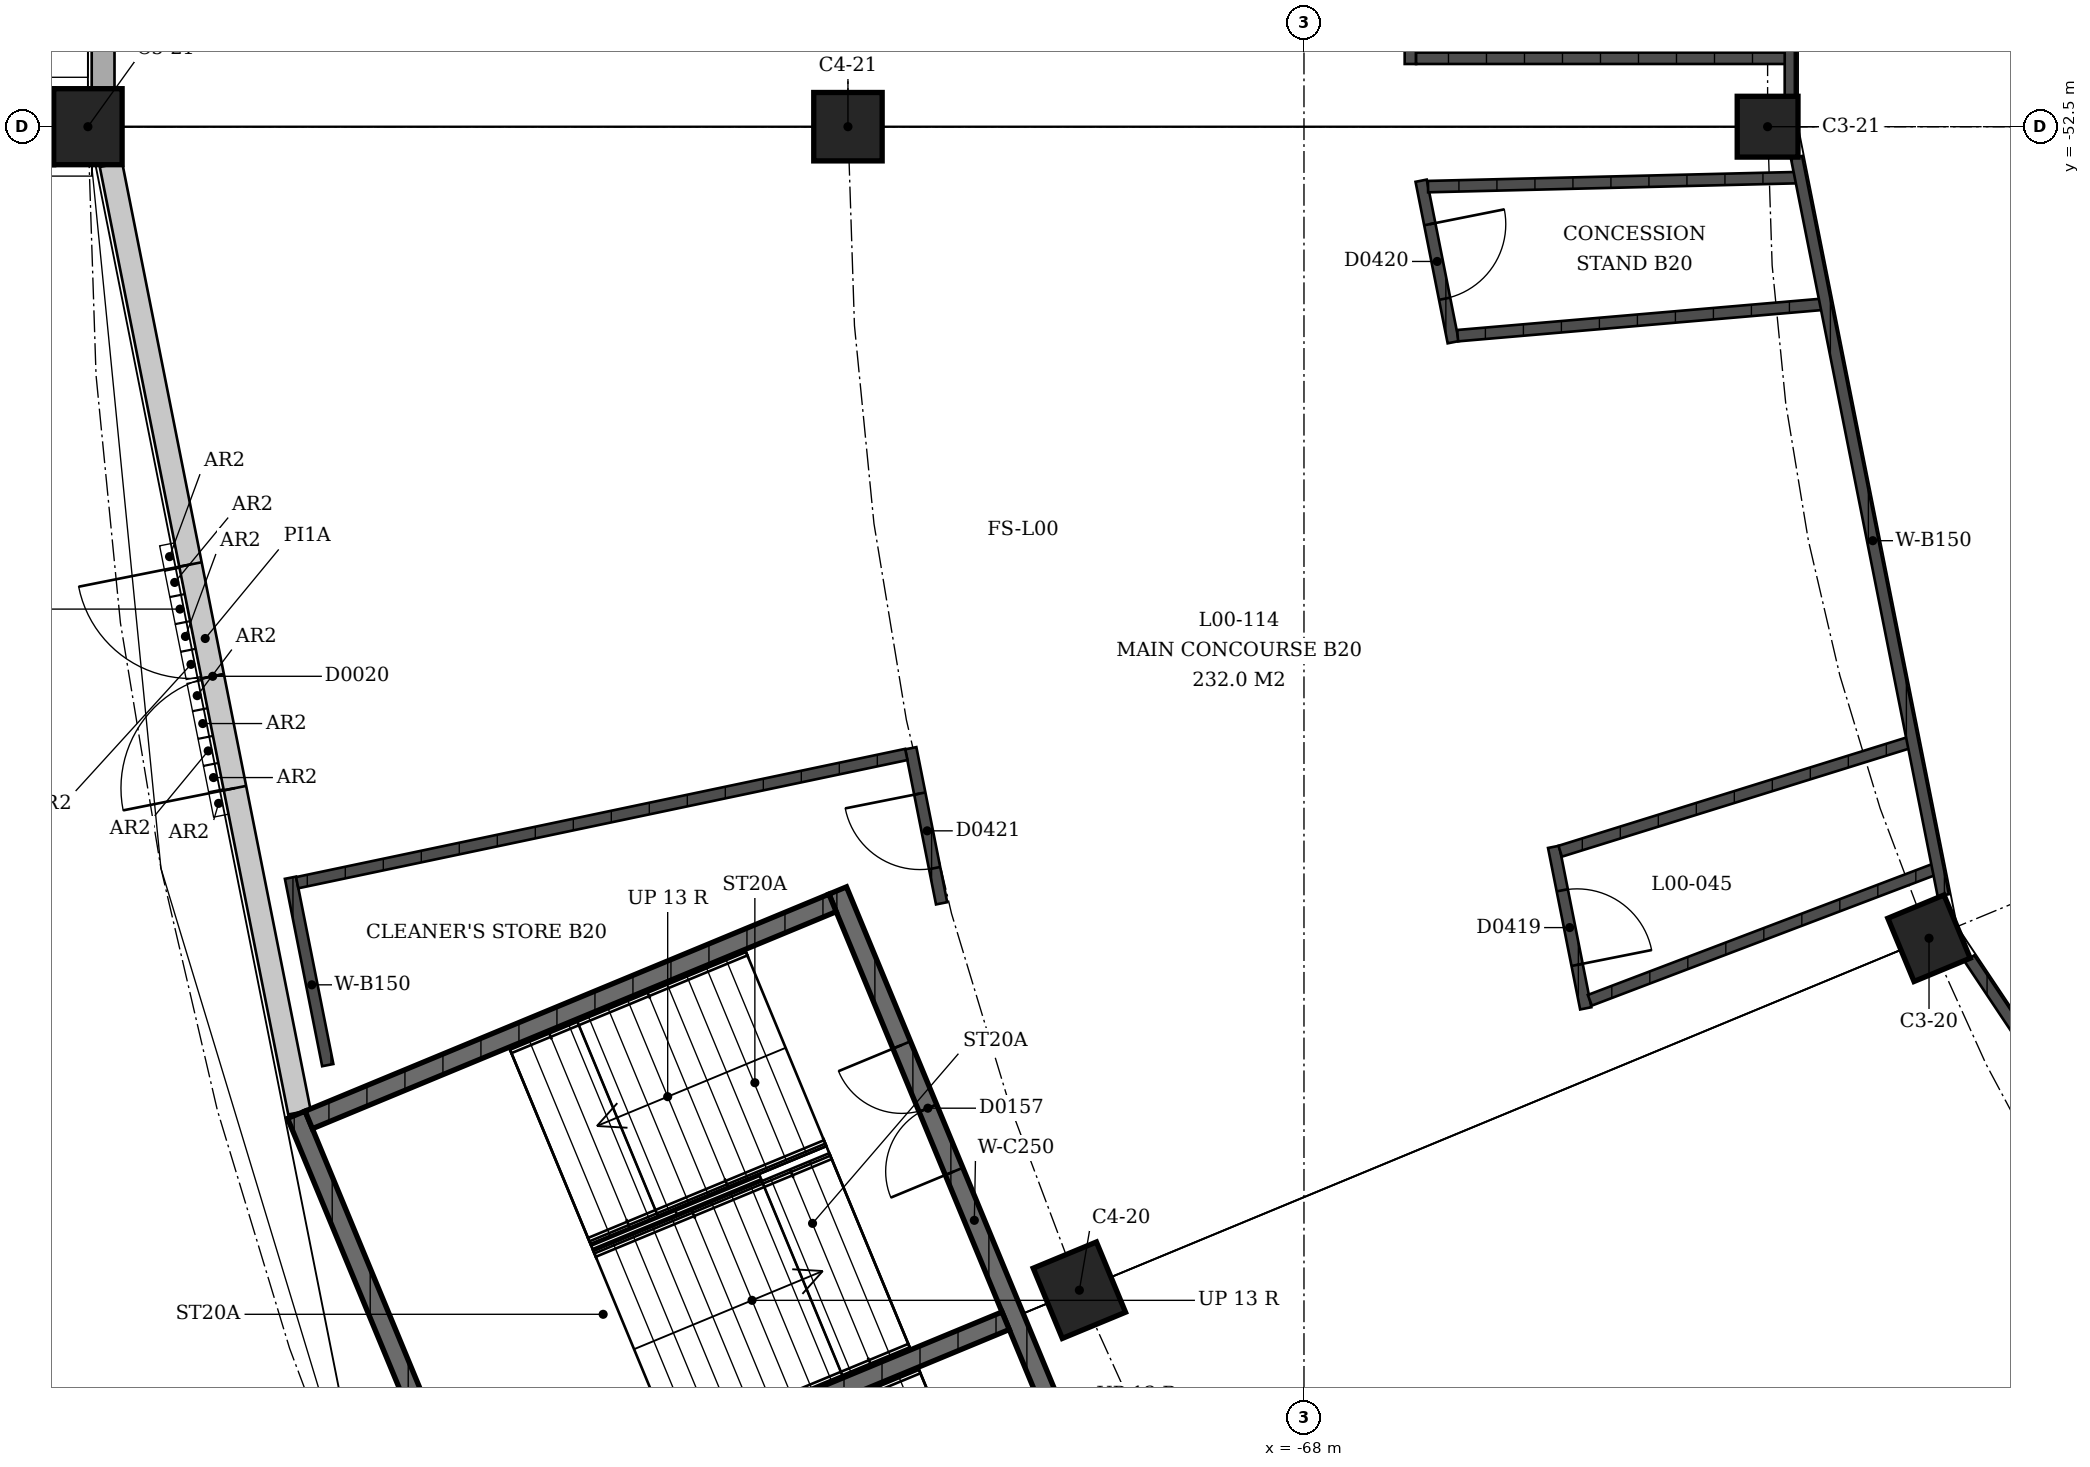
"""IFC4 building model, lengths in metres.
Left out: names, types, materials, properties, quantities, classifications, styles, units other than length and angle.
Written with IfcOpenShell. Run it as: python <this file> out.ifc"""

import sys

from ifc_helpers import new_model, si_unit, direction, frame, frame_2d, origin, origin_2d, place, context, subcontext, project, spatial, rectangle, extrude, element, fill, save


model = new_model("IFC4")
c1 = context("Model", 3, precision=1e-05, world=origin(), true_north=direction((0.0, 1.0)))
c2 = subcontext(c1, "Body", "Model", "MODEL_VIEW")
j1 = project(units=[si_unit("LENGTHUNIT", "METRE"), si_unit("PLANEANGLEUNIT", "RADIAN")], contexts=[c1])
p1 = place(None, origin())
s1 = spatial("IfcSite", under=j1, at=p1, CompositionType="ELEMENT")
p2 = place(p1, origin())
s2 = spatial("IfcBuilding", under=s1, at=p2, CompositionType="ELEMENT")
p3 = place(p2, origin())
s3 = spatial("IfcBuildingStorey", under=s2, at=p3, CompositionType="ELEMENT", Elevation=0.0)
p4 = place(p3, frame((-59.776, -63.177, 0.0), z_axis=(0.0, 0.0, 1.0), x_axis=(0.382683432365, -0.923879532511, 0.0)))
e1 = element("IfcColumn", 1, at=p4, inside=s3, PredefinedType="COLUMN", context=c2, shape_type="SweptSolid", body=[
    extrude(rectangle(XDim=0.9, YDim=0.8, at=origin_2d()), origin(), (0.0, 0.0, 1.0), 4.5),
])
p5 = place(p3, frame((-70.955, -67.807, 0.0), z_axis=(0.0, 0.0, 1.0), x_axis=(0.382683432365, -0.923879532511, 0.0)))
e2 = element("IfcColumn", 2, at=p5, inside=s3, PredefinedType="COLUMN", context=c2, shape_type="SweptSolid", body=[
    extrude(rectangle(XDim=1.0, YDim=0.9, at=origin_2d()), origin(), (0.0, 0.0, 1.0), 4.5),
])
p6 = place(p3, frame((-61.9, -52.5, 0.0), z_axis=(0.0, 0.0, 1.0), x_axis=(0.0, -1.0, 0.0)))
e3 = element("IfcColumn", 3, at=p6, inside=s3, PredefinedType="COLUMN", context=c2, shape_type="SweptSolid", body=[
    extrude(rectangle(XDim=0.8, YDim=0.8, at=origin_2d()), origin(), (0.0, 0.0, 1.0), 4.5),
])
p7 = place(p3, frame((-74.0, -52.5, 0.0), z_axis=(0.0, 0.0, 1.0), x_axis=(0.0, -1.0, 0.0)))
e4 = element("IfcColumn", 4, at=p7, inside=s3, PredefinedType="COLUMN", context=c2, shape_type="SweptSolid", body=[
    extrude(rectangle(XDim=0.9, YDim=0.9, at=origin_2d()), origin(), (0.0, 0.0, 1.0), 4.5),
])
p8 = place(p3, frame((-84.0, -52.5, 0.0), z_axis=(0.0, 0.0, 1.0), x_axis=(0.0, -1.0, 0.0)))
e5 = element("IfcColumn", 5, at=p8, inside=s3, PredefinedType="COLUMN", context=c2, shape_type="SweptSolid", body=[
    extrude(rectangle(XDim=1.0, YDim=0.9, at=origin_2d()), origin(), (0.0, 0.0, 1.0), 4.5),
])
p9 = place(p3, frame((-81.217, -65.467, 0.0), z_axis=(0.0, 0.0, 1.0), x_axis=(-0.195085497421, 0.980786240062, 0.0)))
e6 = element("IfcWall", 6, at=p9, inside=s3, PredefinedType="SOLIDWALL", context=c2, shape_type="SweptSolid", body=[
    extrude(rectangle(XDim=12.711, YDim=0.3, at=frame_2d((6.355, 0.0))), origin(), (0.0, 0.0, 1.0), 2.79),
])
p10 = place(p9, frame((4.349, 0.0, 0.0)))
e7 = element("IfcOpeningElement", 7, at=p10, cuts=e6, PredefinedType="OPENING", context=c2, shape_type="SweptSolid", body=[
    extrude(rectangle(XDim=3.0, YDim=2.4, at=frame_2d((1.5, 1.2))), frame((0.0, 0.16, 0.0), z_axis=(0.0, -1.0, 0.0), x_axis=(1.0, 0.0, 0.0)), (0.0, 0.0, 1.0), 0.32),
])
p11 = place(p3, frame((-83.8, -52.0, 0.0), z_axis=(0.0, 0.0, 1.0), x_axis=(0.0, 1.0, 0.0)))
e8 = element("IfcWall", 8, at=p11, inside=s3, PredefinedType="SOLIDWALL", context=c2, shape_type="SweptSolid", body=[
    extrude(rectangle(XDim=13.9, YDim=0.3, at=frame_2d((6.95, 0.0))), origin(), (0.0, 0.0, 1.0), 3.09),
])
p12 = place(p11, frame((2.062, 0.0, 0.0)))
e9 = element("IfcOpeningElement", 9, at=p12, cuts=e8, PredefinedType="OPENING", context=c2, shape_type="SweptSolid", body=[
    extrude(rectangle(XDim=4.8, YDim=2.4, at=frame_2d((2.4, 1.2))), frame((0.0, 0.16, 0.0), z_axis=(0.0, -1.0, 0.0), x_axis=(1.0, 0.0, 0.0)), (0.0, 0.0, 1.0), 0.32),
])
p13 = place(p3, frame((-74.135, -62.549, 0.0), z_axis=(0.0, 0.0, 1.0), x_axis=(0.382688386133, -0.923877480578, 0.0)))
e10 = element("IfcWall", 10, at=p13, inside=s3, PredefinedType="SHEAR", context=c2, shape_type="SweptSolid", body=[
    extrude(rectangle(XDim=12.15, YDim=0.25, at=frame_2d((6.075, 0.0))), origin(), (0.0, 0.0, 1.0), 4.09),
])
p14 = place(p13, frame((2.2, 0.0, 0.0)))
e11 = element("IfcOpeningElement", 11, at=p14, cuts=e10, PredefinedType="OPENING", context=c2, shape_type="SweptSolid", body=[
    extrude(rectangle(XDim=1.8, YDim=2.1, at=frame_2d((0.9, 1.05))), frame((0.0, 0.125, 0.0), z_axis=(0.0, -1.0, 0.0), x_axis=(1.0, 0.0, 0.0)), (0.0, 0.0, 1.0), 0.25),
])
p15 = place(p13, frame((8.15, 0.0, 0.0)))
e12 = element("IfcOpeningElement", 12, at=p15, cuts=e10, PredefinedType="OPENING", context=c2, shape_type="SweptSolid", body=[
    extrude(rectangle(XDim=1.8, YDim=2.1, at=frame_2d((0.9, 1.05))), frame((0.0, 0.125, 0.0), z_axis=(0.0, -1.0, 0.0), x_axis=(1.0, 0.0, 0.0)), (0.0, 0.0, 1.0), 0.25),
])
p16 = place(p3, frame((-81.258, -65.499, 0.0), z_axis=(0.0, 0.0, 1.0), x_axis=(0.382671234792, -0.923884584817, 0.0)))
e13 = element("IfcWall", 13, at=p16, inside=s3, PredefinedType="SHEAR", context=c2, shape_type="SweptSolid", body=[
    extrude(rectangle(XDim=12.15, YDim=0.25, at=frame_2d((6.075, 0.0))), origin(), (0.0, 0.0, 1.0), 4.09),
])
p17 = place(p3, frame((-74.202, -62.712, 0.0), z_axis=(0.0, 0.0, 1.0), x_axis=(-0.923887204407, -0.382664910245, 0.0)))
e14 = element("IfcWall", 14, at=p17, inside=s3, PredefinedType="SHEAR", context=c2, shape_type="SweptSolid", body=[
    extrude(rectangle(XDim=7.46, YDim=0.25, at=frame_2d((3.73, 0.0))), origin(), (0.0, 0.0, 1.0), 4.09),
])
p18 = place(p3, frame((-71.925, -68.209, 0.0), z_axis=(0.0, 0.0, 1.0), x_axis=(-0.923882412044, -0.382676480483, 0.0)))
e15 = element("IfcWall", 15, at=p18, inside=s3, PredefinedType="SHEAR", context=c2, shape_type="SweptSolid", body=[
    extrude(rectangle(XDim=7.46, YDim=0.25, at=frame_2d((3.73, 0.0))), origin(), (0.0, 0.0, 1.0), 4.09),
])
p19 = place(p3, frame((-64.293, -64.099, 0.0), z_axis=(0.0, 0.0, 1.0), x_axis=(-0.195075759432, 0.980788176969, 0.0)))
e16 = element("IfcWall", 16, at=p19, inside=s3, PredefinedType="SOLIDWALL", context=c2, shape_type="SweptSolid", body=[
    extrude(rectangle(XDim=2.166, YDim=0.15, at=frame_2d((1.083, 0.0))), origin(), (0.0, 0.0, 1.0), 3.0),
])
p20 = place(p19, frame((0.583, 0.0, 0.0)))
e17 = element("IfcOpeningElement", 17, at=p20, cuts=e16, PredefinedType="OPENING", context=c2, shape_type="SweptSolid", body=[
    extrude(rectangle(XDim=1.0, YDim=2.1, at=frame_2d((0.5, 1.05))), frame((0.0, 0.075, 0.0), z_axis=(0.0, -1.0, 0.0), x_axis=(1.0, 0.0, 0.0)), (0.0, 0.0, 1.0), 0.15),
])
p21 = place(p3, frame((-59.66, -62.253, 0.0), z_axis=(0.0, 0.0, 1.0), x_axis=(-0.934765374642, -0.355265667312, 0.0)))
e18 = element("IfcWall", 18, at=p21, inside=s3, PredefinedType="SOLIDWALL", context=c2, shape_type="SweptSolid", body=[
    extrude(rectangle(XDim=4.898, YDim=0.15, at=frame_2d((2.449, 0.0))), origin(), (0.0, 0.0, 1.0), 3.0),
])
p22 = place(p3, frame((-59.991, -60.589, 0.0), z_axis=(0.0, 0.0, 1.0), x_axis=(-0.954830792944, -0.297150057793, 0.0)))
e19 = element("IfcWall", 19, at=p22, inside=s3, PredefinedType="SOLIDWALL", context=c2, shape_type="SweptSolid", body=[
    extrude(rectangle(XDim=4.857, YDim=0.15, at=frame_2d((2.429, 0.0))), origin(), (0.0, 0.0, 1.0), 3.0),
])
p23 = place(p3, frame((-66.036, -55.335, 0.0), z_axis=(0.0, 0.0, 1.0), x_axis=(-0.19505419998, 0.980792464832, 0.0)))
e20 = element("IfcWall", 20, at=p23, inside=s3, PredefinedType="SOLIDWALL", context=c2, shape_type="SweptSolid", body=[
    extrude(rectangle(XDim=2.167, YDim=0.15, at=frame_2d((1.083, 0.0))), origin(), (0.0, 0.0, 1.0), 3.0),
])
p24 = place(p23, frame((0.583, 0.0, 0.0)))
e21 = element("IfcOpeningElement", 21, at=p24, cuts=e20, PredefinedType="OPENING", context=c2, shape_type="SweptSolid", body=[
    extrude(rectangle(XDim=1.0, YDim=2.1, at=frame_2d((0.5, 1.05))), frame((0.0, 0.075, 0.0), z_axis=(0.0, -1.0, 0.0), x_axis=(1.0, 0.0, 0.0)), (0.0, 0.0, 1.0), 0.15),
])
p25 = place(p3, frame((-61.136, -54.833, 0.0), z_axis=(0.0, 0.0, 1.0), x_axis=(-0.996325122781, -0.085651910167, 0.0)))
e22 = element("IfcWall", 22, at=p25, inside=s3, PredefinedType="SOLIDWALL", context=c2, shape_type="SweptSolid", body=[
    extrude(rectangle(XDim=4.86, YDim=0.15, at=frame_2d((2.43, 0.0))), origin(), (0.0, 0.0, 1.0), 3.0),
])
p26 = place(p3, frame((-61.467, -53.169, 0.0), z_axis=(0.0, 0.0, 1.0), x_axis=(-0.999703459918, -0.024351431726, 0.0)))
e23 = element("IfcWall", 23, at=p26, inside=s3, PredefinedType="SOLIDWALL", context=c2, shape_type="SweptSolid", body=[
    extrude(rectangle(XDim=4.903, YDim=0.15, at=frame_2d((2.451, 0.0))), origin(), (0.0, 0.0, 1.0), 3.0),
])
p27 = place(p3, frame((-72.768, -62.717, 0.0), z_axis=(0.0, 0.0, 1.0), x_axis=(-0.195168143279, 0.980769797582, 0.0)))
e24 = element("IfcWall", 24, at=p27, inside=s3, PredefinedType="SOLIDWALL", context=c2, shape_type="SweptSolid", body=[
    extrude(rectangle(XDim=2.08, YDim=0.15, at=frame_2d((1.04, 0.0))), origin(), (0.0, 0.0, 1.0), 3.0),
])
p28 = place(p27, frame((0.472, 0.0, 0.0)))
e25 = element("IfcOpeningElement", 25, at=p28, cuts=e24, PredefinedType="OPENING", context=c2, shape_type="SweptSolid", body=[
    extrude(rectangle(XDim=1.0, YDim=2.1, at=frame_2d((0.5, 1.05))), frame((0.0, 0.075, 0.0), z_axis=(0.0, -1.0, 0.0), x_axis=(1.0, 0.0, 0.0)), (0.0, 0.0, 1.0), 0.15),
])
p29 = place(p3, frame((-80.844, -64.846, 0.0), z_axis=(0.0, 0.0, 1.0), x_axis=(-0.195126097309, 0.980778163577, 0.0)))
e26 = element("IfcWall", 26, at=p29, inside=s3, PredefinedType="SOLIDWALL", context=c2, shape_type="SweptSolid", body=[
    extrude(rectangle(XDim=2.514, YDim=0.15, at=frame_2d((1.257, 0.0))), origin(), (0.0, 0.0, 1.0), 3.0),
])
p30 = place(p3, frame((-73.232, -60.759, 0.0), z_axis=(0.0, 0.0, 1.0), x_axis=(-0.978549468707, -0.206011983374, 0.0)))
e27 = element("IfcWall", 27, at=p30, inside=s3, PredefinedType="SOLIDWALL", context=c2, shape_type="SweptSolid", body=[
    extrude(rectangle(XDim=8.19, YDim=0.15, at=frame_2d((4.095, 0.0))), origin(), (0.0, 0.0, 1.0), 3.0),
])
p31 = place(p3, frame((-66.6, -47.325, 0.0), z_axis=(0.0, 0.0, 1.0), x_axis=(0.0, -1.0, 0.0)))
e28 = element("IfcWall", 28, at=p31, inside=s3, PredefinedType="SOLIDWALL", context=c2, shape_type="SweptSolid", body=[
    extrude(rectangle(XDim=4.35, YDim=0.15, at=frame_2d((2.175, 0.0))), origin(), (0.0, 0.0, 1.0), 3.0),
])
p32 = place(p31, frame((1.675, 0.0, 0.0)))
e29 = element("IfcOpeningElement", 29, at=p32, cuts=e28, PredefinedType="OPENING", context=c2, shape_type="SweptSolid", body=[
    extrude(rectangle(XDim=1.0, YDim=2.1, at=frame_2d((0.5, 1.05))), frame((0.0, 0.075, 0.0), z_axis=(0.0, -1.0, 0.0), x_axis=(1.0, 0.0, 0.0)), (0.0, 0.0, 1.0), 0.15),
])
p33 = place(p3, frame((-61.6, -51.6, 0.0), z_axis=(0.0, 0.0, 1.0), x_axis=(-1.0, 0.0, 0.0)))
e30 = element("IfcWall", 30, at=p33, inside=s3, PredefinedType="SOLIDWALL", context=c2, shape_type="SweptSolid", body=[
    extrude(rectangle(XDim=4.925, YDim=0.15, at=frame_2d((2.462, 0.0))), origin(), (0.0, 0.0, 1.0), 3.0),
])
p34 = place(p3, frame((-53.771, -71.635, 0.0), z_axis=(0.0, 0.0, 1.0), x_axis=(-0.555569179667, 0.83147031613, 0.0)))
e31 = element("IfcWall", 31, at=p34, inside=s3, PredefinedType="SOLIDWALL", context=c2, shape_type="SweptSolid", body=[
    extrude(rectangle(XDim=9.851, YDim=0.15, at=frame_2d((4.926, 0.0))), origin(), (0.0, 0.0, 1.0), 3.0),
])
p35 = place(p34, frame((3.756, 0.0, 0.0)))
e32 = element("IfcOpeningElement", 32, at=p35, cuts=e31, PredefinedType="OPENING", context=c2, shape_type="SweptSolid", body=[
    extrude(rectangle(XDim=2.4, YDim=2.4, at=frame_2d((1.2, 1.2))), frame((0.0, 0.075, 0.0), z_axis=(0.0, -1.0, 0.0), x_axis=(1.0, 0.0, 0.0)), (0.0, 0.0, 1.0), 0.15),
])
p36 = place(p3, frame((-59.589, -62.612, 0.0), z_axis=(0.0, 0.0, 1.0), x_axis=(-0.195091913691, 0.980784963798, 0.0)))
e33 = element("IfcWall", 33, at=p36, inside=s3, PredefinedType="SOLIDWALL", context=c2, shape_type="SweptSolid", body=[
    extrude(rectangle(XDim=9.902, YDim=0.15, at=frame_2d((4.951, 0.0))), origin(), (0.0, 0.0, 1.0), 3.0),
])
p37 = place(p3, frame((-61.6, -52.1, 0.0), z_axis=(0.0, 0.0, 1.0), x_axis=(0.0, 1.0, 0.0)))
e34 = element("IfcWall", 34, at=p37, inside=s3, PredefinedType="SOLIDWALL", context=c2, shape_type="SweptSolid", body=[
    extrude(rectangle(XDim=14.1, YDim=0.15, at=frame_2d((7.05, 0.0))), origin(), (0.0, 0.0, 1.0), 3.0),
])
p38 = place(p37, frame((5.9, 0.0, 0.0)))
e35 = element("IfcOpeningElement", 35, at=p38, cuts=e34, PredefinedType="OPENING", context=c2, shape_type="SweptSolid", body=[
    extrude(rectangle(XDim=2.4, YDim=2.4, at=frame_2d((1.2, 1.2))), frame((0.0, 0.075, 0.0), z_axis=(0.0, -1.0, 0.0), x_axis=(1.0, 0.0, 0.0)), (0.0, 0.0, 1.0), 0.15),
])
p39 = place(p10, origin())
e36 = element("IfcDoor", 36, at=p39, inside=s3, OperationType="DOUBLE_DOOR_SINGLE_SWING", PredefinedType="DOOR", context=c2, shape_type="SweptSolid", body=[
    extrude(rectangle(XDim=3.0, YDim=2.4, at=frame_2d((1.5, 1.2))), frame((0.0, 0.025, 0.0), z_axis=(0.0, -1.0, 0.0), x_axis=(1.0, 0.0, 0.0)), (0.0, 0.0, 1.0), 0.05),
])
fill(e7, e36)
p40 = place(p14, origin())
e37 = element("IfcDoor", 37, at=p40, inside=s3, OperationType="DOUBLE_DOOR_SINGLE_SWING", PredefinedType="DOOR", context=c2, shape_type="SweptSolid", body=[
    extrude(rectangle(XDim=1.8, YDim=2.1, at=frame_2d((0.9, 1.05))), frame((0.0, 0.025, 0.0), z_axis=(0.0, -1.0, 0.0), x_axis=(1.0, 0.0, 0.0)), (0.0, 0.0, 1.0), 0.05),
])
fill(e11, e37)
p41 = place(p20, origin())
e38 = element("IfcDoor", 38, at=p41, inside=s3, OperationType="SINGLE_SWING_LEFT", PredefinedType="DOOR", context=c2, shape_type="SweptSolid", body=[
    extrude(rectangle(XDim=1.0, YDim=2.1, at=frame_2d((0.5, 1.05))), frame((0.0, 0.025, 0.0), z_axis=(0.0, -1.0, 0.0), x_axis=(1.0, 0.0, 0.0)), (0.0, 0.0, 1.0), 0.05),
])
fill(e17, e38)
p42 = place(p24, origin())
e39 = element("IfcDoor", 39, at=p42, inside=s3, OperationType="SINGLE_SWING_RIGHT", PredefinedType="DOOR", context=c2, shape_type="SweptSolid", body=[
    extrude(rectangle(XDim=1.0, YDim=2.1, at=frame_2d((0.5, 1.05))), frame((0.0, 0.025, 0.0), z_axis=(0.0, -1.0, 0.0), x_axis=(1.0, 0.0, 0.0)), (0.0, 0.0, 1.0), 0.05),
])
fill(e21, e39)
p43 = place(p28, origin())
e40 = element("IfcDoor", 40, at=p43, inside=s3, OperationType="SINGLE_SWING_LEFT", PredefinedType="DOOR", context=c2, shape_type="SweptSolid", body=[
    extrude(rectangle(XDim=1.0, YDim=2.1, at=frame_2d((0.5, 1.05))), frame((0.0, 0.025, 0.0), z_axis=(0.0, -1.0, 0.0), x_axis=(1.0, 0.0, 0.0)), (0.0, 0.0, 1.0), 0.05),
])
fill(e25, e40)
save(model, sys.argv[1])
